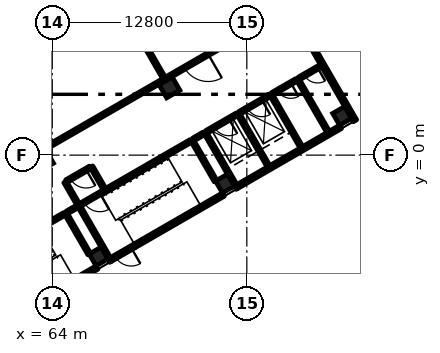
"""IFC4 building model, lengths in metres.
Left out: names, types, materials, properties, quantities, classifications, styles, units other than length and angle.
Written with IfcOpenShell. Run it as: python <this file> out.ifc"""

import sys

from ifc_helpers import new_model, si_unit, direction, frame, frame_2d, origin, origin_2d, place, context, subcontext, project, spatial, rectangle, extrude, element, fill, save


model = new_model("IFC4")
c1 = context("Model", 3, precision=1e-05, world=origin(), true_north=direction((0.0, 1.0)))
c2 = subcontext(c1, "Body", "Model", "MODEL_VIEW")
j1 = project(units=[si_unit("LENGTHUNIT", "METRE"), si_unit("PLANEANGLEUNIT", "RADIAN")], contexts=[c1])
p1 = place(None, origin())
s1 = spatial("IfcSite", under=j1, at=p1, CompositionType="ELEMENT")
p2 = place(p1, origin())
s2 = spatial("IfcBuilding", under=s1, at=p2, CompositionType="ELEMENT")
p3 = place(p2, origin())
s3 = spatial("IfcBuildingStorey", under=s2, at=p3, CompositionType="ELEMENT", Elevation=0.0)
for number, where, z_axis, x_axis in (
    (1, (67.046, -6.671, -0.3), (0.0, 0.0, 1.0), (-0.5, 0.866, 0.0)),
    (2, (75.36, -1.871, -0.3), (0.0, 0.0, 1.0), (-0.5, 0.866, 0.0)),
    (3, (83.067, 2.579, -0.3), (0.0, 0.0, 1.0), (-0.5, 0.866, 0.0)),
):
    element("IfcColumn", number, at=place(p3, frame(where, z_axis=z_axis, x_axis=x_axis)), inside=s3, PredefinedType="COLUMN", context=c2, shape_type="SweptSolid", body=[
        extrude(rectangle(XDim=0.9, YDim=0.9, at=origin_2d()), origin(), (0.0, 0.0, 1.0), 6.3),
    ])
for number, where, z_axis, x_axis in (
    (4, (63.396, -0.349, -0.3), (0.0, 0.0, 1.0), (-0.5, 0.866, 0.0)),
    (5, (71.71, 4.451, -0.3), (0.0, 0.0, 1.0), (-0.5, 0.866, 0.0)),
):
    element("IfcColumn", number, at=place(p3, frame(where, z_axis=z_axis, x_axis=x_axis)), inside=s3, PredefinedType="COLUMN", context=c2, shape_type="SweptSolid", body=[
        extrude(rectangle(XDim=1.0, YDim=1.0, at=origin_2d()), origin(), (0.0, 0.0, 1.0), 6.3),
    ])
for number, where, z_axis, x_axis in (
    (6, (75.394, -1.129, -1.5), (0.0, 0.0, 1.0), (0.866, 0.5, 0.0)),
    (7, (73.919, 1.425, -1.5), (0.0, 0.0, 1.0), (0.866, 0.5, 0.0)),
):
    element("IfcWall", number, at=place(p3, frame(where, z_axis=z_axis, x_axis=x_axis)), inside=s3, PredefinedType="SOLIDWALL", context=c2, shape_type="SweptSolid", body=[
        extrude(rectangle(XDim=5.3, YDim=0.25, at=frame_2d((2.65, 0.0))), origin(), (0.0, 0.0, 1.0), 1.2),
    ])
p4 = place(p3, frame((75.439, -0.959, -1.5), z_axis=(0.0, 0.0, 1.0), x_axis=(-0.499980770555, 0.866036505625, 0.0)))
e8 = element("IfcWall", 8, at=p4, inside=s3, PredefinedType="SOLIDWALL", context=c2, shape_type="SweptSolid", body=[
    extrude(rectangle(XDim=2.7, YDim=0.25, at=frame_2d((1.35, 0.0))), origin(), (0.0, 0.0, 1.0), 1.2),
])
p5 = place(p3, frame((79.813, 1.566, -1.5), z_axis=(0.0, 0.0, 1.0), x_axis=(-0.4999416173, 0.866059108428, 0.0)))
e9 = element("IfcWall", 9, at=p5, inside=s3, PredefinedType="SOLIDWALL", context=c2, shape_type="SweptSolid", body=[
    extrude(rectangle(XDim=2.7, YDim=0.25, at=frame_2d((1.35, 0.0))), origin(), (0.0, 0.0, 1.0), 1.2),
])
p6 = place(p3, frame((81.49, 6.461, 0.0), z_axis=(0.0, 0.0, 1.0), x_axis=(0.500010041276, -0.866019606374, 0.0)))
e10 = element("IfcWall", 10, at=p6, inside=s3, PredefinedType="SOLIDWALL", context=c2, shape_type="SweptSolid", body=[
    extrude(rectangle(XDim=4.85, YDim=0.25, at=frame_2d((2.425, 0.0))), origin(), (0.0, 0.0, 1.0), 5.7),
])
p7 = place(p3, frame((80.34, 8.453, 0.0), z_axis=(0.0, 0.0, 1.0), x_axis=(0.499952165731, -0.866053019151, 0.0)))
e11 = element("IfcWall", 11, at=p7, inside=s3, PredefinedType="SOLIDWALL", context=c2, shape_type="SweptSolid", body=[
    extrude(rectangle(XDim=2.3, YDim=0.25, at=frame_2d((1.15, 0.0))), origin(), (0.0, 0.0, 1.0), 5.7),
])
p8 = place(p7, frame((0.25, 0.0, 0.0)))
e12 = element("IfcOpeningElement", 12, at=p8, cuts=e11, PredefinedType="OPENING", context=c2, shape_type="SweptSolid", body=[
    extrude(rectangle(XDim=1.8, YDim=2.1, at=frame_2d((0.9, 1.05))), frame((0.0, 0.135, 0.0), z_axis=(0.0, -1.0, 0.0), x_axis=(1.0, 0.0, 0.0)), (0.0, 0.0, 1.0), 0.27),
])
p9 = place(p3, frame((66.944, -7.394, 0.0), z_axis=(0.0, 0.0, 1.0), x_axis=(-0.866026575979, -0.499997969693, 0.0)))
e13 = element("IfcWall", 13, at=p9, inside=s3, PredefinedType="SOLIDWALL", context=c2, shape_type="SweptSolid", body=[
    extrude(rectangle(XDim=6.75, YDim=0.25, at=frame_2d((3.375, 0.0))), origin(), (0.0, 0.0, 1.0), 5.7),
])
p10 = place(p3, frame((69.412, -5.969, 0.0), z_axis=(0.0, 0.0, 1.0), x_axis=(-0.866033964044, -0.499985172903, 0.0)))
e14 = element("IfcWall", 14, at=p10, inside=s3, PredefinedType="SOLIDWALL", context=c2, shape_type="SweptSolid", body=[
    extrude(rectangle(XDim=1.85, YDim=0.25, at=frame_2d((0.925, 0.0))), origin(), (0.0, 0.0, 1.0), 5.7),
])
p11 = place(p10, frame((0.25, 0.0, 0.0)))
e15 = element("IfcOpeningElement", 15, at=p11, cuts=e14, PredefinedType="OPENING", context=c2, shape_type="SweptSolid", body=[
    extrude(rectangle(XDim=1.2, YDim=2.1, at=frame_2d((0.6, 1.05))), frame((0.0, 0.135, 0.0), z_axis=(0.0, -1.0, 0.0), x_axis=(1.0, 0.0, 0.0)), (0.0, 0.0, 1.0), 0.27),
])
p12 = place(p3, frame((75.258, -2.594, 0.0), z_axis=(0.0, 0.0, 1.0), x_axis=(-0.866026575979, -0.499997969693, 0.0)))
e16 = element("IfcWall", 16, at=p12, inside=s3, PredefinedType="SOLIDWALL", context=c2, shape_type="SweptSolid", body=[
    extrude(rectangle(XDim=6.75, YDim=0.25, at=frame_2d((3.375, 0.0))), origin(), (0.0, 0.0, 1.0), 5.7),
])
p13 = place(p3, frame((82.965, 1.856, 0.0), z_axis=(0.0, 0.0, 1.0), x_axis=(-0.866026562566, -0.499997992926, 0.0)))
e17 = element("IfcWall", 17, at=p13, inside=s3, PredefinedType="SOLIDWALL", context=c2, shape_type="SweptSolid", body=[
    extrude(rectangle(XDim=7.9, YDim=0.25, at=frame_2d((3.95, 0.0))), origin(), (0.0, 0.0, 1.0), 5.7),
])
p14 = place(p3, frame((67.81, -6.894, 0.0), z_axis=(0.0, 0.0, 1.0), x_axis=(-0.867038199201, -0.4982416694, 0.0)))
e18 = element("IfcWall", 18, at=p14, inside=s3, PredefinedType="SOLIDWALL", context=c2, shape_type="SweptSolid", body=[
    extrude(rectangle(XDim=0.1, YDim=0.25, at=frame_2d((0.05, 0.0))), origin(), (0.0, 0.0, 1.0), 5.7),
])
p15 = place(p3, frame((76.124, -2.094, 0.0), z_axis=(0.0, 0.0, 1.0), x_axis=(-0.865982457891, -0.500074377092, 0.0)))
e19 = element("IfcWall", 19, at=p15, inside=s3, PredefinedType="SOLIDWALL", context=c2, shape_type="SweptSolid", body=[
    extrude(rectangle(XDim=0.1, YDim=0.25, at=frame_2d((0.05, 0.0))), origin(), (0.0, 0.0, 1.0), 5.7),
])
p16 = place(p3, frame((66.431, -6.506, 0.0), z_axis=(0.0, 0.0, 1.0), x_axis=(-0.49999285859, 0.86602952684, 0.0)))
e20 = element("IfcWall", 20, at=p16, inside=s3, PredefinedType="SOLIDWALL", context=c2, shape_type="SweptSolid", body=[
    extrude(rectangle(XDim=3.1, YDim=0.2, at=frame_2d((1.55, 0.0))), origin(), (0.0, 0.0, 1.0), 5.7),
])
p17 = place(p3, frame((67.747, -6.785, 0.0), z_axis=(0.0, 0.0, 1.0), x_axis=(-0.49999894854, 0.866026010844, 0.0)))
e21 = element("IfcWall", 21, at=p17, inside=s3, PredefinedType="SOLIDWALL", context=c2, shape_type="SweptSolid", body=[
    extrude(rectangle(XDim=4.0, YDim=0.2, at=frame_2d((2.0, 0.0))), origin(), (0.0, 0.0, 1.0), 5.7),
])
p18 = place(p3, frame((74.745, -1.706, 0.0), z_axis=(0.0, 0.0, 1.0), x_axis=(-0.500026960575, 0.86600983753, 0.0)))
e22 = element("IfcWall", 22, at=p18, inside=s3, PredefinedType="SOLIDWALL", context=c2, shape_type="SweptSolid", body=[
    extrude(rectangle(XDim=3.1, YDim=0.2, at=frame_2d((1.55, 0.0))), origin(), (0.0, 0.0, 1.0), 5.7),
])
p19 = place(p3, frame((59.035, -7.196, 0.0), z_axis=(0.0, 0.0, 1.0), x_axis=(0.866027239912, 0.49999681972, 0.0)))
e23 = element("IfcWall", 23, at=p19, inside=s3, PredefinedType="SOLIDWALL", context=c2, shape_type="SweptSolid", body=[
    extrude(rectangle(XDim=6.65, YDim=0.2, at=frame_2d((3.325, 0.0))), origin(), (0.0, 0.0, 1.0), 5.7),
])
p20 = place(p3, frame((67.349, -2.396, 0.0), z_axis=(0.0, 0.0, 1.0), x_axis=(-0.866036909293, -0.499980071345, 0.0)))
e24 = element("IfcWall", 24, at=p20, inside=s3, PredefinedType="SOLIDWALL", context=c2, shape_type="SweptSolid", body=[
    extrude(rectangle(XDim=1.75, YDim=0.2, at=frame_2d((0.875, 0.0))), origin(), (0.0, 0.0, 1.0), 5.7),
])
p21 = place(p20, frame((0.25, 0.0, 0.0)))
e25 = element("IfcOpeningElement", 25, at=p21, cuts=e24, PredefinedType="OPENING", context=c2, shape_type="SweptSolid", body=[
    extrude(rectangle(XDim=1.2, YDim=2.1, at=frame_2d((0.6, 1.05))), frame((0.0, 0.11, 0.0), z_axis=(0.0, -1.0, 0.0), x_axis=(1.0, 0.0, 0.0)), (0.0, 0.0, 1.0), 0.22),
])
p22 = place(p3, frame((67.349, -2.396, 0.0), z_axis=(0.0, 0.0, 1.0), x_axis=(0.86601134256, 0.500024353964, 0.0)))
e26 = element("IfcWall", 26, at=p22, inside=s3, PredefinedType="SOLIDWALL", context=c2, shape_type="SweptSolid", body=[
    extrude(rectangle(XDim=6.65, YDim=0.2, at=frame_2d((3.325, 0.0))), origin(), (0.0, 0.0, 1.0), 5.7),
])
for number, where, z_axis, x_axis in (
    (27, (76.061, -1.986, 0.0), (0.0, 0.0, 1.0), (-0.5, 0.866, 0.0)),
    (28, (78.226, -0.736, 0.0), (0.0, 0.0, 1.0), (-0.5, 0.866, 0.0)),
    (29, (80.391, 0.514, 0.0), (0.0, 0.0, 1.0), (-0.5, 0.866, 0.0)),
):
    element("IfcWall", number, at=place(p3, frame(where, z_axis=z_axis, x_axis=x_axis)), inside=s3, PredefinedType="SOLIDWALL", context=c2, shape_type="SweptSolid", body=[
        extrude(rectangle(XDim=4.0, YDim=0.2, at=frame_2d((2.0, 0.0))), origin(), (0.0, 0.0, 1.0), 5.7),
    ])
p23 = place(p3, frame((76.139, 2.679, 0.0), z_axis=(0.0, 0.0, 1.0), x_axis=(-0.865980515519, -0.500077740698, 0.0)))
e30 = element("IfcWall", 30, at=p23, inside=s3, PredefinedType="SOLIDWALL", context=c2, shape_type="SweptSolid", body=[
    extrude(rectangle(XDim=2.3, YDim=0.2, at=frame_2d((1.15, 0.0))), origin(), (0.0, 0.0, 1.0), 5.7),
])
p24 = place(p23, frame((0.6, 0.0, 0.0)))
e31 = element("IfcOpeningElement", 31, at=p24, cuts=e30, PredefinedType="OPENING", context=c2, shape_type="SweptSolid", body=[
    extrude(rectangle(XDim=1.1, YDim=2.1, at=frame_2d((0.55, 1.05))), frame((0.0, 0.11, 0.0), z_axis=(0.0, -1.0, 0.0), x_axis=(1.0, 0.0, 0.0)), (0.0, 0.0, 1.0), 0.22),
])
p25 = place(p3, frame((78.304, 3.929, 0.0), z_axis=(0.0, 0.0, 1.0), x_axis=(-0.865980515519, -0.500077740698, 0.0)))
e32 = element("IfcWall", 32, at=p25, inside=s3, PredefinedType="SOLIDWALL", context=c2, shape_type="SweptSolid", body=[
    extrude(rectangle(XDim=2.3, YDim=0.2, at=frame_2d((1.15, 0.0))), origin(), (0.0, 0.0, 1.0), 5.7),
])
p26 = place(p25, frame((0.6, 0.0, 0.0)))
e33 = element("IfcOpeningElement", 33, at=p26, cuts=e32, PredefinedType="OPENING", context=c2, shape_type="SweptSolid", body=[
    extrude(rectangle(XDim=1.1, YDim=2.1, at=frame_2d((0.55, 1.05))), frame((0.0, 0.11, 0.0), z_axis=(0.0, -1.0, 0.0), x_axis=(1.0, 0.0, 0.0)), (0.0, 0.0, 1.0), 0.22),
])
p27 = place(p3, frame((65.697, -3.235, 0.0), z_axis=(0.0, 0.0, 1.0), x_axis=(-0.499892348375, 0.866087547558, 0.0)))
e34 = element("IfcWall", 34, at=p27, inside=s3, PredefinedType="PARTITIONING", context=c2, shape_type="SweptSolid", body=[
    extrude(rectangle(XDim=1.7, YDim=0.2, at=frame_2d((0.85, 0.0))), origin(), (0.0, 0.0, 1.0), 5.1),
])
p28 = place(p3, frame((67.429, -2.235, 0.0), z_axis=(0.0, 0.0, 1.0), x_axis=(-0.500000056704, 0.866025371046, 0.0)))
e35 = element("IfcWall", 35, at=p28, inside=s3, PredefinedType="PARTITIONING", context=c2, shape_type="SweptSolid", body=[
    extrude(rectangle(XDim=1.7, YDim=0.2, at=frame_2d((0.85, 0.0))), origin(), (0.0, 0.0, 1.0), 5.1),
])
p29 = place(p3, frame((66.493, -0.812, 0.0), z_axis=(0.0, 0.0, 1.0), x_axis=(-0.866081705922, -0.499902469156, 0.0)))
e36 = element("IfcWall", 36, at=p29, inside=s3, PredefinedType="PARTITIONING", context=c2, shape_type="SweptSolid", body=[
    extrude(rectangle(XDim=1.8, YDim=0.2, at=frame_2d((0.9, 0.0))), origin(), (0.0, 0.0, 1.0), 5.1),
])
p30 = place(p29, frame((0.3, 0.0, 0.0)))
e37 = element("IfcOpeningElement", 37, at=p30, cuts=e36, PredefinedType="OPENING", context=c2, shape_type="SweptSolid", body=[
    extrude(rectangle(XDim=1.2, YDim=2.1, at=frame_2d((0.6, 1.05))), frame((0.0, 0.11, 0.0), z_axis=(0.0, -1.0, 0.0), x_axis=(1.0, 0.0, 0.0)), (0.0, 0.0, 1.0), 0.22),
])
p31 = place(p3, frame((82.145, 1.527, 0.0), z_axis=(0.0, 0.0, 1.0), x_axis=(-0.49999894854, 0.866026010844, 0.0)))
e38 = element("IfcWall", 38, at=p31, inside=s3, PredefinedType="PARTITIONING", context=c2, shape_type="SweptSolid", body=[
    extrude(rectangle(XDim=4.0, YDim=0.2, at=frame_2d((2.0, 0.0))), origin(), (0.0, 0.0, 1.0), 5.1),
])
p32 = place(p3, frame((80.058, 4.941, 0.0), z_axis=(0.0, 0.0, 1.0), x_axis=(-0.865978377894, -0.500081442387, 0.0)))
e39 = element("IfcWall", 39, at=p32, inside=s3, PredefinedType="PARTITIONING", context=c2, shape_type="SweptSolid", body=[
    extrude(rectangle(XDim=1.825, YDim=0.2, at=frame_2d((0.913, 0.0))), origin(), (0.0, 0.0, 1.0), 5.1),
])
p33 = place(p32, frame((0.413, 0.0, 0.0)))
e40 = element("IfcOpeningElement", 40, at=p33, cuts=e39, PredefinedType="OPENING", context=c2, shape_type="SweptSolid", body=[
    extrude(rectangle(XDim=1.0, YDim=2.1, at=frame_2d((0.5, 1.05))), frame((0.0, 0.11, 0.0), z_axis=(0.0, -1.0, 0.0), x_axis=(1.0, 0.0, 0.0)), (0.0, 0.0, 1.0), 0.22),
])
p34 = place(p3, frame((81.682, 5.879, 0.0), z_axis=(0.0, 0.0, 1.0), x_axis=(-0.865964676353, -0.500105168249, 0.0)))
e41 = element("IfcWall", 41, at=p34, inside=s3, PredefinedType="PARTITIONING", context=c2, shape_type="SweptSolid", body=[
    extrude(rectangle(XDim=1.675, YDim=0.2, at=frame_2d((0.837, 0.0))), origin(), (0.0, 0.0, 1.0), 5.1),
])
p35 = place(p34, frame((0.262, 0.0, 0.0)))
e42 = element("IfcOpeningElement", 42, at=p35, cuts=e41, PredefinedType="OPENING", context=c2, shape_type="SweptSolid", body=[
    extrude(rectangle(XDim=1.0, YDim=2.1, at=frame_2d((0.5, 1.05))), frame((0.0, 0.11, 0.0), z_axis=(0.0, -1.0, 0.0), x_axis=(1.0, 0.0, 0.0)), (0.0, 0.0, 1.0), 0.22),
])
p36 = place(p3, frame((71.397, 4.992, 0.0), z_axis=(0.0, 0.0, 1.0), x_axis=(-0.500004234368, 0.866022959057, 0.0)))
e43 = element("IfcWall", 43, at=p36, inside=s3, PredefinedType="PARTITIONING", context=c2, shape_type="SweptSolid", body=[
    extrude(rectangle(XDim=6.875, YDim=0.2, at=frame_2d((3.438, 0.0))), origin(), (0.0, 0.0, 1.0), 5.1),
])
p37 = place(p3, frame((63.17, 0.242, 0.0), z_axis=(0.0, 0.0, 1.0), x_axis=(0.866027286158, 0.499996739618, 0.0)))
e44 = element("IfcWall", 44, at=p37, inside=s3, PredefinedType="PARTITIONING", context=c2, shape_type="SweptSolid", body=[
    extrude(rectangle(XDim=9.4, YDim=0.2, at=frame_2d((4.7, 0.0))), origin(), (0.0, 0.0, 1.0), 5.1),
])
p38 = place(p3, frame((64.968, -3.771, 0.0), z_axis=(0.0, 0.0, 1.0), x_axis=(0.865885638426, 0.500242002602, 0.0)))
e45 = element("IfcWall", 45, at=p38, inside=s3, PredefinedType="PARTITIONING", context=c2, shape_type="SweptSolid", body=[
    extrude(rectangle(XDim=0.8, YDim=0.2, at=frame_2d((0.4, 0.0))), origin(), (0.0, 0.0, 1.0), 5.1),
])
p39 = place(p3, frame((73.281, 1.029, 0.0), z_axis=(0.0, 0.0, 1.0), x_axis=(0.865961984968, 0.500109828528, 0.0)))
e46 = element("IfcWall", 46, at=p39, inside=s3, PredefinedType="PARTITIONING", context=c2, shape_type="SweptSolid", body=[
    extrude(rectangle(XDim=0.8, YDim=0.2, at=frame_2d((0.4, 0.0))), origin(), (0.0, 0.0, 1.0), 5.1),
])
p40 = place(p3, frame((75.468, 7.343, 0.0), z_axis=(0.0, 0.0, 1.0), x_axis=(-0.866016770315, -0.500014953309, 0.0)))
e47 = element("IfcWall", 47, at=p40, inside=s3, PredefinedType="PARTITIONING", context=c2, shape_type="SweptSolid", body=[
    extrude(rectangle(XDim=4.6, YDim=0.2, at=frame_2d((2.3, 0.0))), origin(), (0.0, 0.0, 1.0), 5.1),
])
p41 = place(p40, frame((1.4, 0.0, 0.0)))
e48 = element("IfcOpeningElement", 48, at=p41, cuts=e47, PredefinedType="OPENING", context=c2, shape_type="SweptSolid", body=[
    extrude(rectangle(XDim=1.8, YDim=2.1, at=frame_2d((0.9, 1.05))), frame((0.0, 0.11, 0.0), z_axis=(0.0, -1.0, 0.0), x_axis=(1.0, 0.0, 0.0)), (0.0, 0.0, 1.0), 0.22),
])
p42 = place(p8, origin())
e49 = element("IfcDoor", 49, at=p42, inside=s3, OperationType="DOUBLE_DOOR_SINGLE_SWING", PredefinedType="DOOR", context=c2, shape_type="SweptSolid", body=[
    extrude(rectangle(XDim=1.8, YDim=2.1, at=frame_2d((0.9, 1.05))), frame((0.0, 0.025, 0.0), z_axis=(0.0, -1.0, 0.0), x_axis=(1.0, 0.0, 0.0)), (0.0, 0.0, 1.0), 0.05),
])
fill(e12, e49)
p43 = place(p11, origin())
e50 = element("IfcDoor", 50, at=p43, inside=s3, OperationType="SINGLE_SWING_LEFT", PredefinedType="DOOR", context=c2, shape_type="SweptSolid", body=[
    extrude(rectangle(XDim=1.2, YDim=2.1, at=frame_2d((0.6, 1.05))), frame((0.0, 0.025, 0.0), z_axis=(0.0, -1.0, 0.0), x_axis=(1.0, 0.0, 0.0)), (0.0, 0.0, 1.0), 0.05),
])
fill(e15, e50)
p44 = place(p21, origin())
e51 = element("IfcDoor", 51, at=p44, inside=s3, OperationType="SINGLE_SWING_LEFT", PredefinedType="DOOR", context=c2, shape_type="SweptSolid", body=[
    extrude(rectangle(XDim=1.2, YDim=2.1, at=frame_2d((0.6, 1.05))), frame((0.0, 0.025, 0.0), z_axis=(0.0, -1.0, 0.0), x_axis=(1.0, 0.0, 0.0)), (0.0, 0.0, 1.0), 0.05),
])
fill(e25, e51)
p45 = place(p24, origin())
e52 = element("IfcDoor", 52, at=p45, inside=s3, OperationType="DOUBLE_DOOR_SLIDING", PredefinedType="DOOR", context=c2, shape_type="SweptSolid", body=[
    extrude(rectangle(XDim=1.1, YDim=2.1, at=frame_2d((0.55, 1.05))), frame((0.0, 0.025, 0.0), z_axis=(0.0, -1.0, 0.0), x_axis=(1.0, 0.0, 0.0)), (0.0, 0.0, 1.0), 0.05),
])
fill(e31, e52)
p46 = place(p26, origin())
e53 = element("IfcDoor", 53, at=p46, inside=s3, OperationType="DOUBLE_DOOR_SLIDING", PredefinedType="DOOR", context=c2, shape_type="SweptSolid", body=[
    extrude(rectangle(XDim=1.1, YDim=2.1, at=frame_2d((0.55, 1.05))), frame((0.0, 0.025, 0.0), z_axis=(0.0, -1.0, 0.0), x_axis=(1.0, 0.0, 0.0)), (0.0, 0.0, 1.0), 0.05),
])
fill(e33, e53)
p47 = place(p30, origin())
e54 = element("IfcDoor", 54, at=p47, inside=s3, OperationType="SINGLE_SWING_LEFT", PredefinedType="DOOR", context=c2, shape_type="SweptSolid", body=[
    extrude(rectangle(XDim=1.2, YDim=2.1, at=frame_2d((0.6, 1.05))), frame((0.0, 0.025, 0.0), z_axis=(0.0, -1.0, 0.0), x_axis=(1.0, 0.0, 0.0)), (0.0, 0.0, 1.0), 0.05),
])
fill(e37, e54)
p48 = place(p33, origin())
e55 = element("IfcDoor", 55, at=p48, inside=s3, OperationType="SINGLE_SWING_LEFT", PredefinedType="DOOR", context=c2, shape_type="SweptSolid", body=[
    extrude(rectangle(XDim=1.0, YDim=2.1, at=frame_2d((0.5, 1.05))), frame((0.0, 0.025, 0.0), z_axis=(0.0, -1.0, 0.0), x_axis=(1.0, 0.0, 0.0)), (0.0, 0.0, 1.0), 0.05),
])
fill(e40, e55)
p49 = place(p35, origin())
e56 = element("IfcDoor", 56, at=p49, inside=s3, OperationType="SINGLE_SWING_LEFT", PredefinedType="DOOR", context=c2, shape_type="SweptSolid", body=[
    extrude(rectangle(XDim=1.0, YDim=2.1, at=frame_2d((0.5, 1.05))), frame((0.0, 0.025, 0.0), z_axis=(0.0, -1.0, 0.0), x_axis=(1.0, 0.0, 0.0)), (0.0, 0.0, 1.0), 0.05),
])
fill(e42, e56)
p50 = place(p41, origin())
e57 = element("IfcDoor", 57, at=p50, inside=s3, OperationType="DOUBLE_DOOR_SINGLE_SWING", PredefinedType="DOOR", context=c2, shape_type="SweptSolid", body=[
    extrude(rectangle(XDim=1.8, YDim=2.1, at=frame_2d((0.9, 1.05))), frame((0.0, 0.025, 0.0), z_axis=(0.0, -1.0, 0.0), x_axis=(1.0, 0.0, 0.0)), (0.0, 0.0, 1.0), 0.05),
])
fill(e48, e57)
save(model, sys.argv[1])
